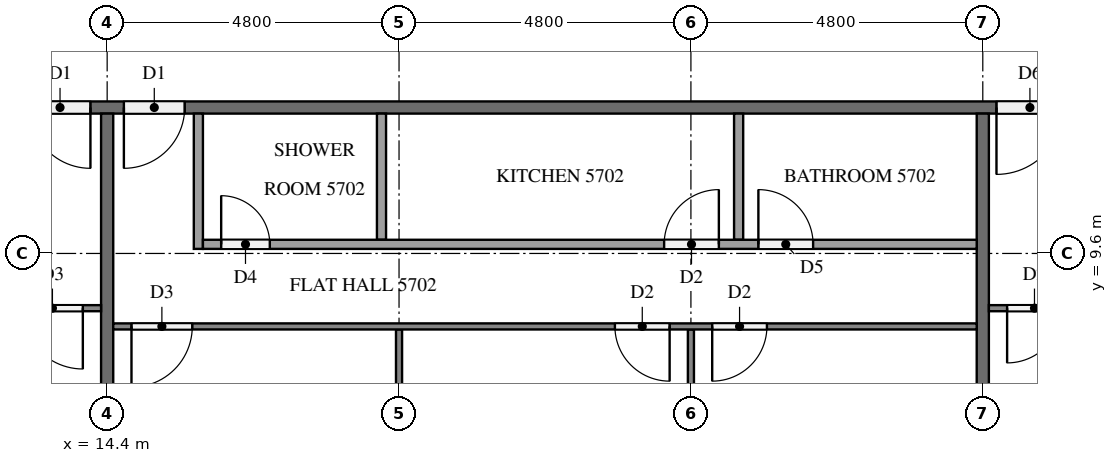
"""IFC4 building model, lengths in metres.
Left out: names, types, materials, properties, quantities, classifications, styles, units other than length and angle.
Written with IfcOpenShell. Run it as: python <this file> out.ifc"""

import sys

from ifc_helpers import new_model, si_unit, direction, frame, frame_2d, origin, place, context, subcontext, project, spatial, rectangle, extrude, element, fill, save


model = new_model("IFC4")
c1 = context("Model", 3, precision=1e-05, world=origin(), true_north=direction((0.0, 1.0)))
c2 = subcontext(c1, "Body", "Model", "MODEL_VIEW")
j1 = project(units=[si_unit("LENGTHUNIT", "METRE"), si_unit("PLANEANGLEUNIT", "RADIAN")], contexts=[c1])
p1 = place(None, origin())
s1 = spatial("IfcSite", under=j1, at=p1, CompositionType="ELEMENT")
p2 = place(p1, origin())
s2 = spatial("IfcBuilding", under=s1, at=p2, CompositionType="ELEMENT")
p3 = place(p2, frame((0.0, 0.0, 219.3)))
s3 = spatial("IfcBuildingStorey", under=s2, at=p3, CompositionType="ELEMENT", Elevation=219.3)
p4 = place(p3, frame((50.5, 12.0, 0.0), z_axis=(0.0, 0.0, 1.0), x_axis=(-1.0, 0.0, 0.0)))
e1 = element("IfcWall", 1, at=p4, inside=s3, PredefinedType="PARTITIONING", context=c2, shape_type="SweptSolid", body=[
    extrude(rectangle(XDim=38.6, YDim=0.2, at=frame_2d((19.3, 0.0))), origin(), (0.0, 0.0, 1.0), 3.2),
])
p5 = place(p4, frame((36.375, 0.0, 0.0)))
e2 = element("IfcOpeningElement", 2, at=p5, cuts=e1, PredefinedType="OPENING", context=c2, shape_type="SweptSolid", body=[
    extrude(rectangle(XDim=1.0, YDim=2.1, at=frame_2d((0.5, 1.05))), frame((0.0, 0.11, 0.0), z_axis=(0.0, -1.0, 0.0), x_axis=(1.0, 0.0, 0.0)), (0.0, 0.0, 1.0), 0.22),
])
p6 = place(p4, frame((34.825, 0.0, 0.0)))
e3 = element("IfcOpeningElement", 3, at=p6, cuts=e1, PredefinedType="OPENING", context=c2, shape_type="SweptSolid", body=[
    extrude(rectangle(XDim=1.0, YDim=2.1, at=frame_2d((0.5, 1.05))), frame((0.0, 0.11, 0.0), z_axis=(0.0, -1.0, 0.0), x_axis=(1.0, 0.0, 0.0)), (0.0, 0.0, 1.0), 0.22),
])
p7 = place(p4, frame((20.375, 0.0, 0.0)))
e4 = element("IfcOpeningElement", 4, at=p7, cuts=e1, PredefinedType="OPENING", context=c2, shape_type="SweptSolid", body=[
    extrude(rectangle(XDim=1.1, YDim=2.1, at=frame_2d((0.55, 1.05))), frame((0.0, 0.11, 0.0), z_axis=(0.0, -1.0, 0.0), x_axis=(1.0, 0.0, 0.0)), (0.0, 0.0, 1.0), 0.22),
])
p8 = place(p4, frame((1.225, 0.0, 0.0)))
e5 = element("IfcOpeningElement", 5, at=p8, cuts=e1, PredefinedType="OPENING", context=c2, shape_type="SweptSolid", body=[
    extrude(rectangle(XDim=1.0, YDim=2.1, at=frame_2d((0.5, 1.05))), frame((0.0, 0.11, 0.0), z_axis=(0.0, -1.0, 0.0), x_axis=(1.0, 0.0, 0.0)), (0.0, 0.0, 1.0), 0.22),
])
p9 = place(p3, frame((14.4, 11.9, 0.0), z_axis=(0.0, 0.0, 1.0), x_axis=(0.0, -1.0, 0.0)))
e6 = element("IfcWall", 6, at=p9, inside=s3, PredefinedType="PARTITIONING", context=c2, shape_type="SweptSolid", body=[
    extrude(rectangle(XDim=7.0, YDim=0.2, at=frame_2d((3.5, 0.0))), origin(), (0.0, 0.0, 1.0), 3.2),
])
p10 = place(p3, frame((28.8, 11.9, 0.0), z_axis=(0.0, 0.0, 1.0), x_axis=(0.0, -1.0, 0.0)))
e7 = element("IfcWall", 7, at=p10, inside=s3, PredefinedType="PARTITIONING", context=c2, shape_type="SweptSolid", body=[
    extrude(rectangle(XDim=6.775, YDim=0.2, at=frame_2d((3.387, 0.0))), origin(), (0.0, 0.0, 1.0), 3.2),
])
p11 = place(p3, frame((14.3, 8.7, 0.0), z_axis=(0.0, 0.0, 1.0), x_axis=(-1.0, 0.0, 0.0)))
e8 = element("IfcWall", 8, at=p11, inside=s3, PredefinedType="PARTITIONING", context=c2, shape_type="SweptSolid", body=[
    extrude(rectangle(XDim=9.159, YDim=0.1, at=frame_2d((4.58, 0.0))), origin(), (0.0, 0.0, 1.0), 3.2),
])
p12 = place(p11, frame((0.3, 0.0, 0.0)))
e9 = element("IfcOpeningElement", 9, at=p12, cuts=e8, PredefinedType="OPENING", context=c2, shape_type="SweptSolid", body=[
    extrude(rectangle(XDim=1.0, YDim=2.1, at=frame_2d((0.5, 1.05))), frame((0.0, 0.06, 0.0), z_axis=(0.0, -1.0, 0.0), x_axis=(1.0, 0.0, 0.0)), (0.0, 0.0, 1.0), 0.12),
])
p13 = place(p11, frame((7.959, 0.0, 0.0)))
e10 = element("IfcOpeningElement", 10, at=p13, cuts=e8, PredefinedType="OPENING", context=c2, shape_type="SweptSolid", body=[
    extrude(rectangle(XDim=0.9, YDim=2.1, at=frame_2d((0.45, 1.05))), frame((0.0, 0.06, 0.0), z_axis=(0.0, -1.0, 0.0), x_axis=(1.0, 0.0, 0.0)), (0.0, 0.0, 1.0), 0.12),
])
p14 = place(p3, frame((19.2, 8.35, 0.0), z_axis=(0.0, 0.0, 1.0), x_axis=(0.0, -1.0, 0.0)))
e11 = element("IfcWall", 11, at=p14, inside=s3, PredefinedType="PARTITIONING", context=c2, shape_type="SweptSolid", body=[
    extrude(rectangle(XDim=3.225, YDim=0.1, at=frame_2d((1.613, 0.0))), origin(), (0.0, 0.0, 1.0), 3.2),
])
p15 = place(p3, frame((24.0, 8.35, 0.0), z_axis=(0.0, 0.0, 1.0), x_axis=(0.0, -1.0, 0.0)))
e12 = element("IfcWall", 12, at=p15, inside=s3, PredefinedType="PARTITIONING", context=c2, shape_type="SweptSolid", body=[
    extrude(rectangle(XDim=3.45, YDim=0.1, at=frame_2d((1.725, 0.0))), origin(), (0.0, 0.0, 1.0), 3.2),
])
p16 = place(p3, frame((28.7, 8.4, 0.0), z_axis=(0.0, 0.0, 1.0), x_axis=(-1.0, 0.0, 0.0)))
e13 = element("IfcWall", 13, at=p16, inside=s3, PredefinedType="PARTITIONING", context=c2, shape_type="SweptSolid", body=[
    extrude(rectangle(XDim=14.2, YDim=0.1, at=frame_2d((7.1, 0.0))), origin(), (0.0, 0.0, 1.0), 3.2),
])
p17 = place(p16, frame((12.9, 0.0, 0.0)))
e14 = element("IfcOpeningElement", 14, at=p17, cuts=e13, PredefinedType="OPENING", context=c2, shape_type="SweptSolid", body=[
    extrude(rectangle(XDim=1.0, YDim=2.1, at=frame_2d((0.5, 1.05))), frame((0.0, 0.06, 0.0), z_axis=(0.0, -1.0, 0.0), x_axis=(1.0, 0.0, 0.0)), (0.0, 0.0, 1.0), 0.12),
])
p18 = place(p16, frame((5.05, 0.0, 0.0)))
e15 = element("IfcOpeningElement", 15, at=p18, cuts=e13, PredefinedType="OPENING", context=c2, shape_type="SweptSolid", body=[
    extrude(rectangle(XDim=0.9, YDim=2.1, at=frame_2d((0.45, 1.05))), frame((0.0, 0.06, 0.0), z_axis=(0.0, -1.0, 0.0), x_axis=(1.0, 0.0, 0.0)), (0.0, 0.0, 1.0), 0.12),
])
p19 = place(p16, frame((3.45, 0.0, 0.0)))
e16 = element("IfcOpeningElement", 16, at=p19, cuts=e13, PredefinedType="OPENING", context=c2, shape_type="SweptSolid", body=[
    extrude(rectangle(XDim=0.9, YDim=2.1, at=frame_2d((0.45, 1.05))), frame((0.0, 0.06, 0.0), z_axis=(0.0, -1.0, 0.0), x_axis=(1.0, 0.0, 0.0)), (0.0, 0.0, 1.0), 0.12),
])
for number, where, z_axis, x_axis in (
    (17, (18.912, 11.9, 0.0), (0.0, 0.0, 1.0), (0.0, -1.0, 0.0)),
    (18, (24.785, 11.9, 0.0), (0.0, 0.0, 1.0), (0.0, -1.0, 0.0)),
):
    element("IfcWall", number, at=place(p3, frame(where, z_axis=z_axis, x_axis=x_axis)), inside=s3, PredefinedType="PARTITIONING", context=c2, shape_type="SweptSolid", body=[
        extrude(rectangle(XDim=2.075, YDim=0.15, at=frame_2d((1.038, 0.0))), origin(), (0.0, 0.0, 1.0), 3.2),
    ])
p20 = place(p3, frame((15.9, 11.9, 0.0), z_axis=(0.0, 0.0, 1.0), x_axis=(0.0, -1.0, 0.0)))
e19 = element("IfcWall", 19, at=p20, inside=s3, PredefinedType="PARTITIONING", context=c2, shape_type="SweptSolid", body=[
    extrude(rectangle(XDim=2.225, YDim=0.15, at=frame_2d((1.112, 0.0))), origin(), (0.0, 0.0, 1.0), 3.2),
])
p21 = place(p3, frame((15.975, 9.75, 0.0), z_axis=(0.0, 0.0, 1.0), x_axis=(1.0, 0.0, 0.0)))
e20 = element("IfcWall", 20, at=p21, inside=s3, PredefinedType="PARTITIONING", context=c2, shape_type="SweptSolid", body=[
    extrude(rectangle(XDim=12.725, YDim=0.15, at=frame_2d((6.362, 0.0))), origin(), (0.0, 0.0, 1.0), 3.2),
])
p22 = place(p21, frame((0.3, 0.0, 0.0)))
e21 = element("IfcOpeningElement", 21, at=p22, cuts=e20, PredefinedType="OPENING", context=c2, shape_type="SweptSolid", body=[
    extrude(rectangle(XDim=0.8, YDim=2.1, at=frame_2d((0.4, 1.05))), frame((0.0, 0.085, 0.0), z_axis=(0.0, -1.0, 0.0), x_axis=(1.0, 0.0, 0.0)), (0.0, 0.0, 1.0), 0.17),
])
p23 = place(p21, frame((7.585, 0.0, 0.0)))
e22 = element("IfcOpeningElement", 22, at=p23, cuts=e20, PredefinedType="OPENING", context=c2, shape_type="SweptSolid", body=[
    extrude(rectangle(XDim=0.9, YDim=2.1, at=frame_2d((0.45, 1.05))), frame((0.0, 0.085, 0.0), z_axis=(0.0, -1.0, 0.0), x_axis=(1.0, 0.0, 0.0)), (0.0, 0.0, 1.0), 0.17),
])
p24 = place(p21, frame((9.135, 0.0, 0.0)))
e23 = element("IfcOpeningElement", 23, at=p24, cuts=e20, PredefinedType="OPENING", context=c2, shape_type="SweptSolid", body=[
    extrude(rectangle(XDim=0.9, YDim=2.1, at=frame_2d((0.45, 1.05))), frame((0.0, 0.085, 0.0), z_axis=(0.0, -1.0, 0.0), x_axis=(1.0, 0.0, 0.0)), (0.0, 0.0, 1.0), 0.17),
])
p25 = place(p3, frame((47.9, 8.7, 0.0), z_axis=(0.0, 0.0, 1.0), x_axis=(-1.0, 0.0, 0.0)))
e24 = element("IfcWall", 24, at=p25, inside=s3, PredefinedType="PARTITIONING", context=c2, shape_type="SweptSolid", body=[
    extrude(rectangle(XDim=19.0, YDim=0.1, at=frame_2d((9.5, 0.0))), origin(), (0.0, 0.0, 1.0), 3.2),
])
p26 = place(p25, frame((17.8, 0.0, 0.0)))
e25 = element("IfcOpeningElement", 25, at=p26, cuts=e24, PredefinedType="OPENING", context=c2, shape_type="SweptSolid", body=[
    extrude(rectangle(XDim=0.9, YDim=2.1, at=frame_2d((0.45, 1.05))), frame((0.0, 0.06, 0.0), z_axis=(0.0, -1.0, 0.0), x_axis=(1.0, 0.0, 0.0)), (0.0, 0.0, 1.0), 0.12),
])
p27 = place(p25, frame((9.85, 0.0, 0.0)))
e26 = element("IfcOpeningElement", 26, at=p27, cuts=e24, PredefinedType="OPENING", context=c2, shape_type="SweptSolid", body=[
    extrude(rectangle(XDim=0.9, YDim=2.1, at=frame_2d((0.45, 1.05))), frame((0.0, 0.06, 0.0), z_axis=(0.0, -1.0, 0.0), x_axis=(1.0, 0.0, 0.0)), (0.0, 0.0, 1.0), 0.12),
])
p28 = place(p25, frame((8.25, 0.0, 0.0)))
e27 = element("IfcOpeningElement", 27, at=p28, cuts=e24, PredefinedType="OPENING", context=c2, shape_type="SweptSolid", body=[
    extrude(rectangle(XDim=0.9, YDim=2.1, at=frame_2d((0.45, 1.05))), frame((0.0, 0.06, 0.0), z_axis=(0.0, -1.0, 0.0), x_axis=(1.0, 0.0, 0.0)), (0.0, 0.0, 1.0), 0.12),
])
p29 = place(p25, frame((0.3, 0.0, 0.0)))
e28 = element("IfcOpeningElement", 28, at=p29, cuts=e24, PredefinedType="OPENING", context=c2, shape_type="SweptSolid", body=[
    extrude(rectangle(XDim=1.0, YDim=2.1, at=frame_2d((0.5, 1.05))), frame((0.0, 0.06, 0.0), z_axis=(0.0, -1.0, 0.0), x_axis=(1.0, 0.0, 0.0)), (0.0, 0.0, 1.0), 0.12),
])
p30 = place(p5, origin())
e29 = element("IfcDoor", 29, at=p30, inside=s3, OperationType="SINGLE_SWING_LEFT", PredefinedType="DOOR", context=c2, shape_type="SweptSolid", body=[
    extrude(rectangle(XDim=1.0, YDim=2.1, at=frame_2d((0.5, 1.05))), frame((0.0, 0.025, 0.0), z_axis=(0.0, -1.0, 0.0), x_axis=(1.0, 0.0, 0.0)), (0.0, 0.0, 1.0), 0.05),
])
fill(e2, e29)
p31 = place(p6, origin())
e30 = element("IfcDoor", 30, at=p31, inside=s3, OperationType="SINGLE_SWING_RIGHT", PredefinedType="DOOR", context=c2, shape_type="SweptSolid", body=[
    extrude(rectangle(XDim=1.0, YDim=2.1, at=frame_2d((0.5, 1.05))), frame((0.0, 0.025, 0.0), z_axis=(0.0, -1.0, 0.0), x_axis=(1.0, 0.0, 0.0)), (0.0, 0.0, 1.0), 0.05),
])
fill(e3, e30)
p32 = place(p7, origin())
e31 = element("IfcDoor", 31, at=p32, inside=s3, OperationType="SINGLE_SWING_RIGHT", PredefinedType="DOOR", context=c2, shape_type="SweptSolid", body=[
    extrude(rectangle(XDim=1.1, YDim=2.1, at=frame_2d((0.55, 1.05))), frame((0.0, 0.025, 0.0), z_axis=(0.0, -1.0, 0.0), x_axis=(1.0, 0.0, 0.0)), (0.0, 0.0, 1.0), 0.05),
])
fill(e4, e31)
p33 = place(p12, origin())
e32 = element("IfcDoor", 32, at=p33, inside=s3, OperationType="SINGLE_SWING_LEFT", PredefinedType="DOOR", context=c2, shape_type="SweptSolid", body=[
    extrude(rectangle(XDim=1.0, YDim=2.1, at=frame_2d((0.5, 1.05))), frame((0.0, 0.025, 0.0), z_axis=(0.0, -1.0, 0.0), x_axis=(1.0, 0.0, 0.0)), (0.0, 0.0, 1.0), 0.05),
])
fill(e9, e32)
p34 = place(p17, origin())
e33 = element("IfcDoor", 33, at=p34, inside=s3, OperationType="SINGLE_SWING_RIGHT", PredefinedType="DOOR", context=c2, shape_type="SweptSolid", body=[
    extrude(rectangle(XDim=1.0, YDim=2.1, at=frame_2d((0.5, 1.05))), frame((0.0, 0.025, 0.0), z_axis=(0.0, -1.0, 0.0), x_axis=(1.0, 0.0, 0.0)), (0.0, 0.0, 1.0), 0.05),
])
fill(e14, e33)
p35 = place(p18, origin())
e34 = element("IfcDoor", 34, at=p35, inside=s3, OperationType="SINGLE_SWING_LEFT", PredefinedType="DOOR", context=c2, shape_type="SweptSolid", body=[
    extrude(rectangle(XDim=0.9, YDim=2.1, at=frame_2d((0.45, 1.05))), frame((0.0, 0.025, 0.0), z_axis=(0.0, -1.0, 0.0), x_axis=(1.0, 0.0, 0.0)), (0.0, 0.0, 1.0), 0.05),
])
fill(e15, e34)
p36 = place(p19, origin())
e35 = element("IfcDoor", 35, at=p36, inside=s3, OperationType="SINGLE_SWING_RIGHT", PredefinedType="DOOR", context=c2, shape_type="SweptSolid", body=[
    extrude(rectangle(XDim=0.9, YDim=2.1, at=frame_2d((0.45, 1.05))), frame((0.0, 0.025, 0.0), z_axis=(0.0, -1.0, 0.0), x_axis=(1.0, 0.0, 0.0)), (0.0, 0.0, 1.0), 0.05),
])
fill(e16, e35)
p37 = place(p22, origin())
e36 = element("IfcDoor", 36, at=p37, inside=s3, OperationType="SINGLE_SWING_LEFT", PredefinedType="DOOR", context=c2, shape_type="SweptSolid", body=[
    extrude(rectangle(XDim=0.8, YDim=2.1, at=frame_2d((0.4, 1.05))), frame((0.0, 0.025, 0.0), z_axis=(0.0, -1.0, 0.0), x_axis=(1.0, 0.0, 0.0)), (0.0, 0.0, 1.0), 0.05),
])
fill(e21, e36)
p38 = place(p23, origin())
e37 = element("IfcDoor", 37, at=p38, inside=s3, OperationType="SINGLE_SWING_RIGHT", PredefinedType="DOOR", context=c2, shape_type="SweptSolid", body=[
    extrude(rectangle(XDim=0.9, YDim=2.1, at=frame_2d((0.45, 1.05))), frame((0.0, 0.025, 0.0), z_axis=(0.0, -1.0, 0.0), x_axis=(1.0, 0.0, 0.0)), (0.0, 0.0, 1.0), 0.05),
])
fill(e22, e37)
p39 = place(p24, origin())
e38 = element("IfcDoor", 38, at=p39, inside=s3, OperationType="SINGLE_SWING_LEFT", PredefinedType="DOOR", context=c2, shape_type="SweptSolid", body=[
    extrude(rectangle(XDim=0.9, YDim=2.1, at=frame_2d((0.45, 1.05))), frame((0.0, 0.025, 0.0), z_axis=(0.0, -1.0, 0.0), x_axis=(1.0, 0.0, 0.0)), (0.0, 0.0, 1.0), 0.05),
])
fill(e23, e38)
p40 = place(p26, origin())
e39 = element("IfcDoor", 39, at=p40, inside=s3, OperationType="SINGLE_SWING_RIGHT", PredefinedType="DOOR", context=c2, shape_type="SweptSolid", body=[
    extrude(rectangle(XDim=0.9, YDim=2.1, at=frame_2d((0.45, 1.05))), frame((0.0, 0.025, 0.0), z_axis=(0.0, -1.0, 0.0), x_axis=(1.0, 0.0, 0.0)), (0.0, 0.0, 1.0), 0.05),
])
fill(e25, e39)
save(model, sys.argv[1])
